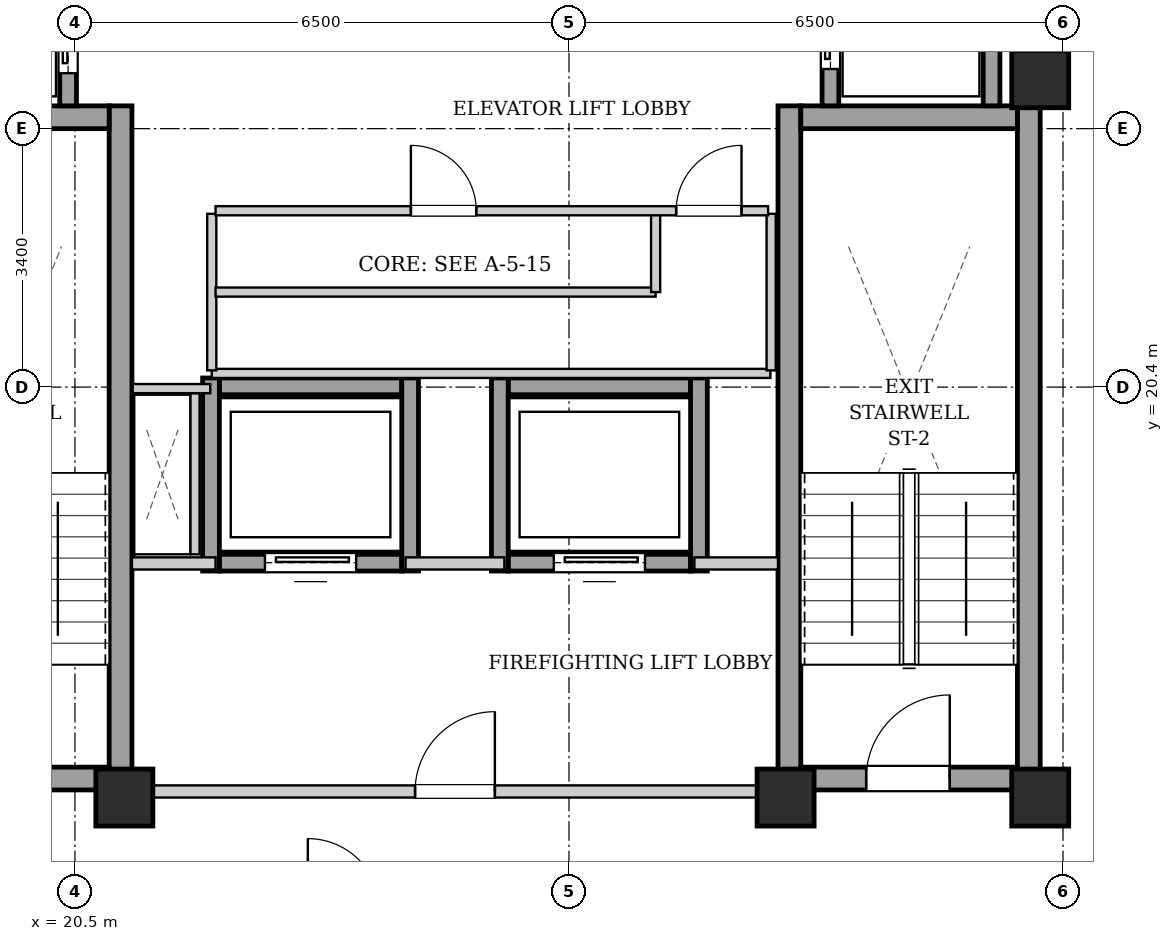
"""IFC4 building model, lengths in metres.
Left out: names, types, materials, properties, quantities, classifications, styles, units other than length and angle.
Written with IfcOpenShell. Run it as: python <this file> out.ifc"""

import sys

from ifc_helpers import new_model, si_unit, direction, frame, frame_2d, origin, origin_2d, place, context, subcontext, project, spatial, rectangle, extrude, element, fill, save


model = new_model("IFC4")
c1 = context("Model", 3, precision=1e-05, world=origin(), true_north=direction((0.0, 1.0)))
c2 = subcontext(c1, "Body", "Model", "MODEL_VIEW")
j1 = project(units=[si_unit("LENGTHUNIT", "METRE"), si_unit("PLANEANGLEUNIT", "RADIAN")], contexts=[c1])
p1 = place(None, origin())
s1 = spatial("IfcSite", under=j1, at=p1, CompositionType="ELEMENT")
p2 = place(p1, origin())
s2 = spatial("IfcBuilding", under=s1, at=p2, CompositionType="ELEMENT")
p3 = place(p2, frame((0.0, 0.0, 217.3)))
s3 = spatial("IfcBuildingStorey", under=s2, at=p3, CompositionType="ELEMENT", Elevation=217.3)
for number, where, z_axis, x_axis in (
    (1, (21.15, 15.0, 0.0), (0.0, 0.0, 1.0), (1.0, 0.0, 0.0)),
    (2, (29.85, 15.0, 0.0), (0.0, 0.0, 1.0), (1.0, 0.0, 0.0)),
    (3, (33.2, 15.0, 0.0), (0.0, 0.0, 1.0), (1.0, 0.0, 0.0)),
    (4, (33.2, 24.45, 0.0), (0.0, 0.0, 1.0), (1.0, 0.0, 0.0)),
):
    element("IfcColumn", number, at=place(p3, frame(where, z_axis=z_axis, x_axis=x_axis)), inside=s3, PredefinedType="COLUMN", context=c2, shape_type="SweptSolid", body=[
        extrude(rectangle(XDim=0.75, YDim=0.75, at=origin_2d()), origin(), (0.0, 0.0, 1.0), 3.4),
    ])
p4 = place(p3, frame((21.1, 15.1, 0.0), z_axis=(0.0, 0.0, 1.0), x_axis=(0.0, 1.0, 0.0)))
e5 = element("IfcWall", 5, at=p4, inside=s3, PredefinedType="SHEAR", context=c2, shape_type="SweptSolid", body=[
    extrude(rectangle(XDim=9.0, YDim=0.3, at=frame_2d((4.5, 0.0))), origin(), (0.0, 0.0, 1.0), 3.14),
])
p5 = place(p3, frame((18.1, 23.95, 0.0), z_axis=(0.0, 0.0, 1.0), x_axis=(1.0, 0.0, 0.0)))
e6 = element("IfcWall", 6, at=p5, inside=s3, PredefinedType="SHEAR", context=c2, shape_type="SweptSolid", body=[
    extrude(rectangle(XDim=2.85, YDim=0.3, at=frame_2d((1.425, 0.0))), origin(), (0.0, 0.0, 1.0), 3.14),
])
p6 = place(p3, frame((18.1, 15.25, 0.0), z_axis=(0.0, 0.0, 1.0), x_axis=(1.0, 0.0, 0.0)))
e7 = element("IfcWall", 7, at=p6, inside=s3, PredefinedType="SHEAR", context=c2, shape_type="SweptSolid", body=[
    extrude(rectangle(XDim=2.85, YDim=0.3, at=frame_2d((1.425, 0.0))), origin(), (0.0, 0.0, 1.0), 3.14),
])
p7 = place(p6, frame((0.86, 0.0, 0.0)))
e8 = element("IfcOpeningElement", 8, at=p7, cuts=e7, PredefinedType="OPENING", context=c2, shape_type="SweptSolid", body=[
    extrude(rectangle(XDim=1.1, YDim=2.05, at=frame_2d((0.55, 1.025))), frame((0.0, 0.16, 0.0), z_axis=(0.0, -1.0, 0.0), x_axis=(1.0, 0.0, 0.0)), (0.0, 0.0, 1.0), 0.32),
])
for number, where, z_axis, x_axis in (
    (9, (29.9, 15.1, 0.0), (0.0, 0.0, 1.0), (0.0, 1.0, 0.0)),
    (10, (33.05, 15.1, 0.0), (0.0, 0.0, 1.0), (0.0, 1.0, 0.0)),
):
    element("IfcWall", number, at=place(p3, frame(where, z_axis=z_axis, x_axis=x_axis)), inside=s3, PredefinedType="SHEAR", context=c2, shape_type="SweptSolid", body=[
        extrude(rectangle(XDim=9.0, YDim=0.3, at=frame_2d((4.5, 0.0))), origin(), (0.0, 0.0, 1.0), 3.14),
    ])
p8 = place(p3, frame((30.05, 23.95, 0.0), z_axis=(0.0, 0.0, 1.0), x_axis=(1.0, 0.0, 0.0)))
e11 = element("IfcWall", 11, at=p8, inside=s3, PredefinedType="SHEAR", context=c2, shape_type="SweptSolid", body=[
    extrude(rectangle(XDim=2.85, YDim=0.3, at=frame_2d((1.425, 0.0))), origin(), (0.0, 0.0, 1.0), 3.14),
])
p9 = place(p3, frame((30.05, 15.25, 0.0), z_axis=(0.0, 0.0, 1.0), x_axis=(1.0, 0.0, 0.0)))
e12 = element("IfcWall", 12, at=p9, inside=s3, PredefinedType="SHEAR", context=c2, shape_type="SweptSolid", body=[
    extrude(rectangle(XDim=2.85, YDim=0.3, at=frame_2d((1.425, 0.0))), origin(), (0.0, 0.0, 1.0), 3.14),
])
p10 = place(p9, frame((0.86, 0.0, 0.0)))
e13 = element("IfcOpeningElement", 13, at=p10, cuts=e12, PredefinedType="OPENING", context=c2, shape_type="SweptSolid", body=[
    extrude(rectangle(XDim=1.1, YDim=2.05, at=frame_2d((0.55, 1.025))), frame((0.0, 0.16, 0.0), z_axis=(0.0, -1.0, 0.0), x_axis=(1.0, 0.0, 0.0)), (0.0, 0.0, 1.0), 0.32),
])
p11 = place(p3, frame((20.41, 24.1, 0.0), z_axis=(0.0, 0.0, 1.0), x_axis=(0.0, 1.0, 0.0)))
e14 = element("IfcWall", 14, at=p11, inside=s3, PredefinedType="SHEAR", context=c2, shape_type="SweptSolid", body=[
    extrude(rectangle(XDim=1.96, YDim=0.22, at=frame_2d((0.98, 0.0))), origin(), (0.0, 0.0, 1.0), 3.14),
])
p12 = place(p11, frame((0.43, 0.0, 0.0)))
e15 = element("IfcOpeningElement", 15, at=p12, cuts=e14, PredefinedType="OPENING", context=c2, shape_type="SweptSolid", body=[
    extrude(rectangle(XDim=1.1, YDim=2.15, at=frame_2d((0.55, 1.075))), frame((0.0, 0.12, 0.0), z_axis=(0.0, -1.0, 0.0), x_axis=(1.0, 0.0, 0.0)), (0.0, 0.0, 1.0), 0.24),
])
p13 = place(p3, frame((30.44, 24.1, 0.0), z_axis=(0.0, 0.0, 1.0), x_axis=(0.0, 1.0, 0.0)))
e16 = element("IfcWall", 16, at=p13, inside=s3, PredefinedType="SHEAR", context=c2, shape_type="SweptSolid", body=[
    extrude(rectangle(XDim=2.07, YDim=0.22, at=frame_2d((1.035, 0.0))), origin(), (0.0, 0.0, 1.0), 3.14),
])
p14 = place(p13, frame((0.485, 0.0, 0.0)))
e17 = element("IfcOpeningElement", 17, at=p14, cuts=e16, PredefinedType="OPENING", context=c2, shape_type="SweptSolid", body=[
    extrude(rectangle(XDim=1.1, YDim=2.15, at=frame_2d((0.55, 1.075))), frame((0.0, 0.12, 0.0), z_axis=(0.0, -1.0, 0.0), x_axis=(1.0, 0.0, 0.0)), (0.0, 0.0, 1.0), 0.24),
])
p15 = place(p3, frame((32.56, 24.1, 0.0), z_axis=(0.0, 0.0, 1.0), x_axis=(0.0, 1.0, 0.0)))
e18 = element("IfcWall", 18, at=p15, inside=s3, PredefinedType="SHEAR", context=c2, shape_type="SweptSolid", body=[
    extrude(rectangle(XDim=2.07, YDim=0.22, at=frame_2d((1.035, 0.0))), origin(), (0.0, 0.0, 1.0), 3.14),
])
p16 = place(p3, frame((22.4, 18.09, 0.0), z_axis=(0.0, 0.0, 1.0), x_axis=(1.0, 0.0, 0.0)))
e19 = element("IfcWall", 19, at=p16, inside=s3, PredefinedType="SHEAR", context=c2, shape_type="SweptSolid", body=[
    extrude(rectangle(XDim=2.4, YDim=0.22, at=frame_2d((1.2, 0.0))), origin(), (0.0, 0.0, 1.0), 3.14),
])
p17 = place(p16, frame((0.6, 0.0, 0.0)))
e20 = element("IfcOpeningElement", 20, at=p17, cuts=e19, PredefinedType="OPENING", context=c2, shape_type="SweptSolid", body=[
    extrude(rectangle(XDim=1.2, YDim=2.15, at=frame_2d((0.6, 1.075))), frame((0.0, 0.12, 0.0), z_axis=(0.0, -1.0, 0.0), x_axis=(1.0, 0.0, 0.0)), (0.0, 0.0, 1.0), 0.24),
])
p18 = place(p3, frame((22.4, 20.41, 0.0), z_axis=(0.0, 0.0, 1.0), x_axis=(1.0, 0.0, 0.0)))
e21 = element("IfcWall", 21, at=p18, inside=s3, PredefinedType="SHEAR", context=c2, shape_type="SweptSolid", body=[
    extrude(rectangle(XDim=2.4, YDim=0.22, at=frame_2d((1.2, 0.0))), origin(), (0.0, 0.0, 1.0), 3.14),
])
for number, where, z_axis, x_axis in (
    (22, (22.29, 17.98, 0.0), (0.0, 0.0, 1.0), (0.0, 1.0, 0.0)),
    (23, (24.91, 17.98, 0.0), (0.0, 0.0, 1.0), (0.0, 1.0, 0.0)),
):
    element("IfcWall", number, at=place(p3, frame(where, z_axis=z_axis, x_axis=x_axis)), inside=s3, PredefinedType="SHEAR", context=c2, shape_type="SweptSolid", body=[
        extrude(rectangle(XDim=2.54, YDim=0.22, at=frame_2d((1.27, 0.0))), origin(), (0.0, 0.0, 1.0), 3.14),
    ])
p19 = place(p3, frame((26.2, 18.09, 0.0), z_axis=(0.0, 0.0, 1.0), x_axis=(1.0, 0.0, 0.0)))
e24 = element("IfcWall", 24, at=p19, inside=s3, PredefinedType="SHEAR", context=c2, shape_type="SweptSolid", body=[
    extrude(rectangle(XDim=2.4, YDim=0.22, at=frame_2d((1.2, 0.0))), origin(), (0.0, 0.0, 1.0), 3.14),
])
p20 = place(p19, frame((0.6, 0.0, 0.0)))
e25 = element("IfcOpeningElement", 25, at=p20, cuts=e24, PredefinedType="OPENING", context=c2, shape_type="SweptSolid", body=[
    extrude(rectangle(XDim=1.2, YDim=2.15, at=frame_2d((0.6, 1.075))), frame((0.0, 0.12, 0.0), z_axis=(0.0, -1.0, 0.0), x_axis=(1.0, 0.0, 0.0)), (0.0, 0.0, 1.0), 0.24),
])
p21 = place(p3, frame((26.2, 20.41, 0.0), z_axis=(0.0, 0.0, 1.0), x_axis=(1.0, 0.0, 0.0)))
e26 = element("IfcWall", 26, at=p21, inside=s3, PredefinedType="SHEAR", context=c2, shape_type="SweptSolid", body=[
    extrude(rectangle(XDim=2.4, YDim=0.22, at=frame_2d((1.2, 0.0))), origin(), (0.0, 0.0, 1.0), 3.14),
])
for number, where, z_axis, x_axis in (
    (27, (26.09, 17.98, 0.0), (0.0, 0.0, 1.0), (0.0, 1.0, 0.0)),
    (28, (28.71, 17.98, 0.0), (0.0, 0.0, 1.0), (0.0, 1.0, 0.0)),
):
    element("IfcWall", number, at=place(p3, frame(where, z_axis=z_axis, x_axis=x_axis)), inside=s3, PredefinedType="SHEAR", context=c2, shape_type="SweptSolid", body=[
        extrude(rectangle(XDim=2.54, YDim=0.22, at=frame_2d((1.27, 0.0))), origin(), (0.0, 0.0, 1.0), 3.14),
    ])
p22 = place(p3, frame((21.25, 15.08, 0.0), z_axis=(0.0, 0.0, 1.0), x_axis=(1.0, 0.0, 0.0)))
e29 = element("IfcWall", 29, at=p22, inside=s3, PredefinedType="PARTITIONING", context=c2, shape_type="SweptSolid", body=[
    extrude(rectangle(XDim=8.5, YDim=0.16, at=frame_2d((4.25, 0.0))), origin(), (0.0, 0.0, 1.0), 2.668),
])
p23 = place(p22, frame((3.725, 0.0, 0.0)))
e30 = element("IfcOpeningElement", 30, at=p23, cuts=e29, PredefinedType="OPENING", context=c2, shape_type="SweptSolid", body=[
    extrude(rectangle(XDim=1.05, YDim=2.05, at=frame_2d((0.525, 1.025))), frame((0.0, 0.09, 0.0), z_axis=(0.0, -1.0, 0.0), x_axis=(1.0, 0.0, 0.0)), (0.0, 0.0, 1.0), 0.18),
])
p24 = place(p3, frame((21.25, 18.08, 0.0), z_axis=(0.0, 0.0, 1.0), x_axis=(1.0, 0.0, 0.0)))
e31 = element("IfcWall", 31, at=p24, inside=s3, PredefinedType="PARTITIONING", context=c2, shape_type="SweptSolid", body=[
    extrude(rectangle(XDim=1.1, YDim=0.16, at=frame_2d((0.55, 0.0))), origin(), (0.0, 0.0, 1.0), 3.14),
])
p25 = place(p3, frame((24.85, 18.08, 0.0), z_axis=(0.0, 0.0, 1.0), x_axis=(1.0, 0.0, 0.0)))
e32 = element("IfcWall", 32, at=p25, inside=s3, PredefinedType="PARTITIONING", context=c2, shape_type="SweptSolid", body=[
    extrude(rectangle(XDim=1.3, YDim=0.16, at=frame_2d((0.65, 0.0))), origin(), (0.0, 0.0, 1.0), 3.14),
])
p26 = place(p3, frame((28.65, 18.08, 0.0), z_axis=(0.0, 0.0, 1.0), x_axis=(1.0, 0.0, 0.0)))
e33 = element("IfcWall", 33, at=p26, inside=s3, PredefinedType="PARTITIONING", context=c2, shape_type="SweptSolid", body=[
    extrude(rectangle(XDim=1.1, YDim=0.16, at=frame_2d((0.55, 0.0))), origin(), (0.0, 0.0, 1.0), 3.14),
])
p27 = place(p3, frame((33.12, 24.12, 0.0), z_axis=(0.0, 0.0, 1.0), x_axis=(0.0, 1.0, 0.0)))
e34 = element("IfcWall", 34, at=p27, inside=s3, PredefinedType="PARTITIONING", context=c2, shape_type="SweptSolid", body=[
    extrude(rectangle(XDim=4.76, YDim=0.16, at=frame_2d((2.38, 0.0))), origin(), (0.0, 0.0, 1.0), 2.475),
])
p28 = place(p3, frame((22.08, 18.2, 0.0), z_axis=(0.0, 0.0, 1.0), x_axis=(0.0, 1.0, 0.0)))
e35 = element("IfcWall", 35, at=p28, inside=s3, PredefinedType="PARTITIONING", context=c2, shape_type="SweptSolid", body=[
    extrude(rectangle(XDim=2.12, YDim=0.12, at=frame_2d((1.06, 0.0))), origin(), (0.0, 0.0, 1.0), 3.14),
])
p29 = place(p3, frame((22.28, 20.38, 0.0), z_axis=(0.0, 0.0, 1.0), x_axis=(-1.0, 0.0, 0.0)))
e36 = element("IfcWall", 36, at=p29, inside=s3, PredefinedType="PARTITIONING", context=c2, shape_type="SweptSolid", body=[
    extrude(rectangle(XDim=1.02, YDim=0.12, at=frame_2d((0.51, 0.0))), origin(), (0.0, 0.0, 1.0), 3.14),
])
p30 = place(p3, frame((22.3, 20.58, 0.0), z_axis=(0.0, 0.0, 1.0), x_axis=(1.0, 0.0, 0.0)))
e37 = element("IfcWall", 37, at=p30, inside=s3, PredefinedType="PARTITIONING", context=c2, shape_type="SweptSolid", body=[
    extrude(rectangle(XDim=7.35, YDim=0.12, at=frame_2d((3.675, 0.0))), origin(), (0.0, 0.0, 1.0), 3.14),
])
for number, where, z_axis, x_axis in (
    (38, (22.3, 20.62, 0.0), (0.0, 0.0, 1.0), (0.0, 1.0, 0.0)),
    (39, (29.66, 20.62, 0.0), (0.0, 0.0, 1.0), (0.0, 1.0, 0.0)),
):
    element("IfcWall", number, at=place(p3, frame(where, z_axis=z_axis, x_axis=x_axis)), inside=s3, PredefinedType="PARTITIONING", context=c2, shape_type="SweptSolid", body=[
        extrude(rectangle(XDim=2.06, YDim=0.12, at=frame_2d((1.03, 0.0))), origin(), (0.0, 0.0, 1.0), 3.14),
    ])
p31 = place(p3, frame((22.35, 21.65, 0.0), z_axis=(0.0, 0.0, 1.0), x_axis=(1.0, 0.0, 0.0)))
e40 = element("IfcWall", 40, at=p31, inside=s3, PredefinedType="PARTITIONING", context=c2, shape_type="SweptSolid", body=[
    extrude(rectangle(XDim=5.79, YDim=0.12, at=frame_2d((2.895, 0.0))), origin(), (0.0, 0.0, 1.0), 3.14),
])
p32 = place(p3, frame((28.14, 21.65, 0.0), z_axis=(0.0, 0.0, 1.0), x_axis=(0.0, 1.0, 0.0)))
e41 = element("IfcWall", 41, at=p32, inside=s3, PredefinedType="PARTITIONING", context=c2, shape_type="SweptSolid", body=[
    extrude(rectangle(XDim=1.03, YDim=0.12, at=frame_2d((0.515, 0.0))), origin(), (0.0, 0.0, 1.0), 3.14),
])
p33 = place(p3, frame((22.35, 22.72, 0.0), z_axis=(0.0, 0.0, 1.0), x_axis=(1.0, 0.0, 0.0)))
e42 = element("IfcWall", 42, at=p33, inside=s3, PredefinedType="PARTITIONING", context=c2, shape_type="SweptSolid", body=[
    extrude(rectangle(XDim=7.27, YDim=0.12, at=frame_2d((3.635, 0.0))), origin(), (0.0, 0.0, 1.0), 3.14),
])
p34 = place(p33, frame((2.57, 0.0, 0.0)))
e43 = element("IfcOpeningElement", 43, at=p34, cuts=e42, PredefinedType="OPENING", context=c2, shape_type="SweptSolid", body=[
    extrude(rectangle(XDim=0.86, YDim=2.05, at=frame_2d((0.43, 1.025))), frame((0.0, 0.07, 0.0), z_axis=(0.0, -1.0, 0.0), x_axis=(1.0, 0.0, 0.0)), (0.0, 0.0, 1.0), 0.14),
])
p35 = place(p33, frame((6.06, 0.0, 0.0)))
e44 = element("IfcOpeningElement", 44, at=p35, cuts=e42, PredefinedType="OPENING", context=c2, shape_type="SweptSolid", body=[
    extrude(rectangle(XDim=0.86, YDim=2.05, at=frame_2d((0.43, 1.025))), frame((0.0, 0.07, 0.0), z_axis=(0.0, -1.0, 0.0), x_axis=(1.0, 0.0, 0.0)), (0.0, 0.0, 1.0), 0.14),
])
p36 = place(p10, origin())
e45 = element("IfcDoor", 45, at=p36, inside=s3, OperationType="SINGLE_SWING_RIGHT", PredefinedType="DOOR", context=c2, shape_type="SweptSolid", body=[
    extrude(rectangle(XDim=1.1, YDim=2.05, at=frame_2d((0.55, 1.025))), frame((0.0, 0.025, 0.0), z_axis=(0.0, -1.0, 0.0), x_axis=(1.0, 0.0, 0.0)), (0.0, 0.0, 1.0), 0.05),
])
fill(e13, e45)
p37 = place(p12, origin())
e46 = element("IfcDoor", 46, at=p37, inside=s3, OperationType="SLIDING_TO_LEFT", PredefinedType="DOOR", context=c2, shape_type="SweptSolid", body=[
    extrude(rectangle(XDim=1.1, YDim=2.15, at=frame_2d((0.55, 1.075))), frame((0.0, 0.025, 0.0), z_axis=(0.0, -1.0, 0.0), x_axis=(1.0, 0.0, 0.0)), (0.0, 0.0, 1.0), 0.05),
])
fill(e15, e46)
p38 = place(p14, origin())
e47 = element("IfcDoor", 47, at=p38, inside=s3, OperationType="SLIDING_TO_LEFT", PredefinedType="DOOR", context=c2, shape_type="SweptSolid", body=[
    extrude(rectangle(XDim=1.1, YDim=2.15, at=frame_2d((0.55, 1.075))), frame((0.0, 0.025, 0.0), z_axis=(0.0, -1.0, 0.0), x_axis=(1.0, 0.0, 0.0)), (0.0, 0.0, 1.0), 0.05),
])
fill(e17, e47)
p39 = place(p17, origin())
e48 = element("IfcDoor", 48, at=p39, inside=s3, OperationType="SLIDING_TO_LEFT", PredefinedType="DOOR", context=c2, shape_type="SweptSolid", body=[
    extrude(rectangle(XDim=1.2, YDim=2.15, at=frame_2d((0.6, 1.075))), frame((0.0, 0.025, 0.0), z_axis=(0.0, -1.0, 0.0), x_axis=(1.0, 0.0, 0.0)), (0.0, 0.0, 1.0), 0.05),
])
fill(e20, e48)
p40 = place(p20, origin())
e49 = element("IfcDoor", 49, at=p40, inside=s3, OperationType="SLIDING_TO_LEFT", PredefinedType="DOOR", context=c2, shape_type="SweptSolid", body=[
    extrude(rectangle(XDim=1.2, YDim=2.15, at=frame_2d((0.6, 1.075))), frame((0.0, 0.025, 0.0), z_axis=(0.0, -1.0, 0.0), x_axis=(1.0, 0.0, 0.0)), (0.0, 0.0, 1.0), 0.05),
])
fill(e25, e49)
p41 = place(p23, origin())
e50 = element("IfcDoor", 50, at=p41, inside=s3, OperationType="SINGLE_SWING_RIGHT", PredefinedType="DOOR", context=c2, shape_type="SweptSolid", body=[
    extrude(rectangle(XDim=1.05, YDim=2.05, at=frame_2d((0.525, 1.025))), frame((0.0, 0.025, 0.0), z_axis=(0.0, -1.0, 0.0), x_axis=(1.0, 0.0, 0.0)), (0.0, 0.0, 1.0), 0.05),
])
fill(e30, e50)
p42 = place(p34, origin())
e51 = element("IfcDoor", 51, at=p42, inside=s3, OperationType="SINGLE_SWING_LEFT", PredefinedType="DOOR", context=c2, shape_type="SweptSolid", body=[
    extrude(rectangle(XDim=0.86, YDim=2.05, at=frame_2d((0.43, 1.025))), frame((0.0, 0.025, 0.0), z_axis=(0.0, -1.0, 0.0), x_axis=(1.0, 0.0, 0.0)), (0.0, 0.0, 1.0), 0.05),
])
fill(e43, e51)
p43 = place(p35, origin())
e52 = element("IfcDoor", 52, at=p43, inside=s3, OperationType="SINGLE_SWING_RIGHT", PredefinedType="DOOR", context=c2, shape_type="SweptSolid", body=[
    extrude(rectangle(XDim=0.86, YDim=2.05, at=frame_2d((0.43, 1.025))), frame((0.0, 0.025, 0.0), z_axis=(0.0, -1.0, 0.0), x_axis=(1.0, 0.0, 0.0)), (0.0, 0.0, 1.0), 0.05),
])
fill(e44, e52)
save(model, sys.argv[1])
